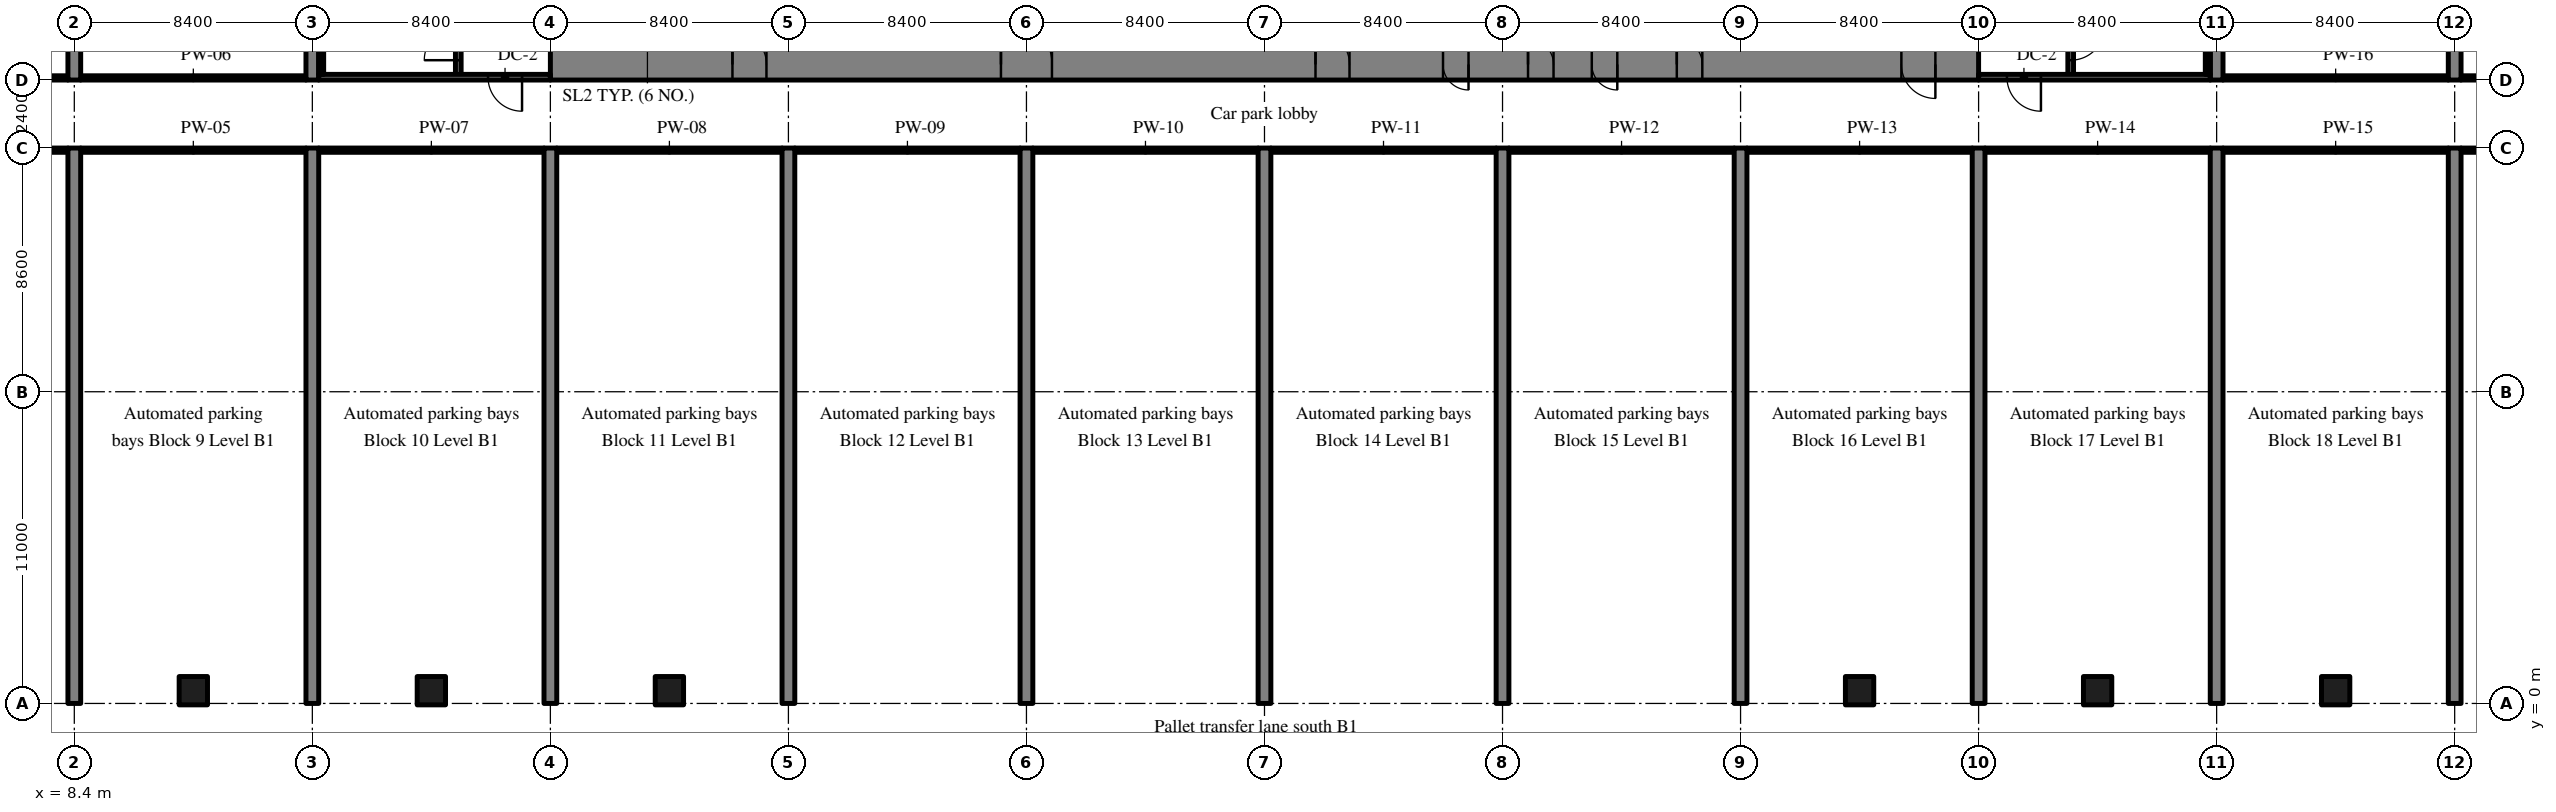
"""IFC4 building model, lengths in metres.
Left out: names, types, materials, properties, quantities, classifications, styles, units other than length and angle.
Written with IfcOpenShell. Run it as: python <this file> out.ifc"""

import sys

from ifc_helpers import new_model, si_unit, direction, frame, frame_2d, origin, origin_2d, place, context, subcontext, project, spatial, rectangle, extrude, source, transform, mapped, element, fill, save


model = new_model("IFC4")
c1 = context("Model", 3, precision=1e-05, world=origin(), true_north=direction((0.0, 1.0)))
c2 = subcontext(c1, "Body", "Model", "MODEL_VIEW")
j1 = project(units=[si_unit("LENGTHUNIT", "METRE"), si_unit("PLANEANGLEUNIT", "RADIAN")], contexts=[c1])
p1 = place(None, origin())
s1 = spatial("IfcSite", under=j1, at=p1, CompositionType="ELEMENT")
p2 = place(p1, origin())
s2 = spatial("IfcBuilding", under=s1, at=p2, CompositionType="ELEMENT")
p3 = place(p2, frame((0.0, 0.0, -4.5)))
s3 = spatial("IfcBuildingStorey", under=s2, at=p3, CompositionType="ELEMENT", Elevation=-4.5)
m1 = source(origin(), c2, "Body", "SweptSolid", [
    extrude(rectangle(XDim=50.4, YDim=1.1, at=frame_2d((25.2, 0.0))), origin(), (0.0, 0.0, 1.0), 4.22),
])
p4 = place(p3, frame((25.2, 22.55, 0.0), z_axis=(0.0, 0.0, 1.0), x_axis=(1.0, 0.0, 0.0)))
e1 = element("IfcWall", 1, at=p4, inside=s3, PredefinedType="SHEAR", context=c2, shape_type="MappedRepresentation", body=[
    mapped(m1, transform((0.0, 0.0, 0.0), scale=1.0)),
])
m2 = source(origin(), c2, "Body", "SweptSolid", [
    extrude(rectangle(XDim=1.8, YDim=2.1, at=frame_2d((0.9, 1.05))), frame((0.0, 0.56, 0.0), z_axis=(0.0, -1.0, 0.0), x_axis=(1.0, 0.0, 0.0)), (0.0, 0.0, 1.0), 1.12),
])
p5 = place(p4, frame((15.9, 0.0, 0.0)))
e2 = element("IfcOpeningElement", 2, at=p5, cuts=e1, PredefinedType="OPENING", context=c2, shape_type="MappedRepresentation", body=[
    mapped(m2, transform((0.0, 0.0, 0.0), scale=1.0)),
])
m3 = source(origin(), c2, "Body", "SweptSolid", [
    extrude(rectangle(XDim=1.2, YDim=2.1, at=frame_2d((0.6, 1.05))), frame((0.0, 0.56, 0.0), z_axis=(0.0, -1.0, 0.0), x_axis=(1.0, 0.0, 0.0)), (0.0, 0.0, 1.0), 1.12),
])
p6 = place(p4, frame((27.0, 0.0, 0.0)))
e3 = element("IfcOpeningElement", 3, at=p6, cuts=e1, PredefinedType="OPENING", context=c2, shape_type="MappedRepresentation", body=[
    mapped(m3, transform((0.0, 0.0, 0.0), scale=1.0)),
])
m4 = source(origin(), c2, "Body", "SweptSolid", [
    extrude(rectangle(XDim=0.9, YDim=2.1, at=frame_2d((0.45, 1.05))), frame((0.0, 0.56, 0.0), z_axis=(0.0, -1.0, 0.0), x_axis=(1.0, 0.0, 0.0)), (0.0, 0.0, 1.0), 1.12),
])
p7 = place(p4, frame((34.5, 0.0, 0.0)))
e4 = element("IfcOpeningElement", 4, at=p7, cuts=e1, PredefinedType="OPENING", context=c2, shape_type="MappedRepresentation", body=[
    mapped(m4, transform((0.0, 0.0, 0.0), scale=1.0)),
])
p8 = place(p4, frame((31.5, 0.0, 0.0)))
e5 = element("IfcOpeningElement", 5, at=p8, cuts=e1, PredefinedType="OPENING", context=c2, shape_type="MappedRepresentation", body=[
    mapped(m4, transform((0.0, 0.0, 0.0), scale=1.0)),
])
p9 = place(p4, frame((39.75, 0.0, 0.0)))
e6 = element("IfcOpeningElement", 6, at=p9, cuts=e1, PredefinedType="OPENING", context=c2, shape_type="MappedRepresentation", body=[
    mapped(m4, transform((0.0, 0.0, 0.0), scale=1.0)),
])
p10 = place(p4, frame((36.75, 0.0, 0.0)))
e7 = element("IfcOpeningElement", 7, at=p10, cuts=e1, PredefinedType="OPENING", context=c2, shape_type="MappedRepresentation", body=[
    mapped(m4, transform((0.0, 0.0, 0.0), scale=1.0)),
])
p11 = place(p4, frame((6.425, 0.0, 0.0)))
e8 = element("IfcOpeningElement", 8, at=p11, cuts=e1, PredefinedType="OPENING", context=c2, shape_type="MappedRepresentation", body=[
    mapped(m3, transform((0.0, 0.0, 0.0), scale=1.0)),
])
p12 = place(p4, frame((47.675, 0.0, 0.0)))
e9 = element("IfcOpeningElement", 9, at=p12, cuts=e1, PredefinedType="OPENING", context=c2, shape_type="MappedRepresentation", body=[
    mapped(m3, transform((0.0, 0.0, 0.0), scale=1.0)),
])
m5 = source(origin(), c2, "Body", "SweptSolid", [
    extrude(rectangle(XDim=19.6, YDim=0.45, at=frame_2d((9.8, 0.0))), origin(), (0.0, 0.0, 1.0), 4.22),
])
p13 = place(p3, frame((8.4, 0.0, 0.0), z_axis=(0.0, 0.0, 1.0), x_axis=(0.0, 1.0, 0.0)))
e10 = element("IfcWall", 10, at=p13, inside=s3, PredefinedType="SHEAR", context=c2, shape_type="MappedRepresentation", body=[
    mapped(m5, transform((0.0, 0.0, 0.0), scale=1.0)),
])
m6 = source(origin(), c2, "Body", "SweptSolid", [
    extrude(rectangle(XDim=20.0, YDim=0.45, at=frame_2d((10.0, 0.0))), origin(), (0.0, 0.0, 1.0), 4.22),
])
p14 = place(p3, frame((8.4, 22.0, 0.0), z_axis=(0.0, 0.0, 1.0), x_axis=(0.0, 1.0, 0.0)))
e11 = element("IfcWall", 11, at=p14, inside=s3, PredefinedType="SHEAR", context=c2, shape_type="MappedRepresentation", body=[
    mapped(m6, transform((0.0, 0.0, 0.0), scale=1.0)),
])
p15 = place(p3, frame((16.8, 0.0, 0.0), z_axis=(0.0, 0.0, 1.0), x_axis=(0.0, 1.0, 0.0)))
e12 = element("IfcWall", 12, at=p15, inside=s3, PredefinedType="SHEAR", context=c2, shape_type="MappedRepresentation", body=[
    mapped(m5, transform((0.0, 0.0, 0.0), scale=1.0)),
])
p16 = place(p3, frame((16.8, 22.0, 0.0), z_axis=(0.0, 0.0, 1.0), x_axis=(0.0, 1.0, 0.0)))
e13 = element("IfcWall", 13, at=p16, inside=s3, PredefinedType="SHEAR", context=c2, shape_type="MappedRepresentation", body=[
    mapped(m6, transform((0.0, 0.0, 0.0), scale=1.0)),
])
for number, where, z_axis, x_axis in (
    (14, (25.2, 0.0, 0.0), (0.0, 0.0, 1.0), (0.0, 1.0, 0.0)),
    (15, (33.6, 0.0, 0.0), (0.0, 0.0, 1.0), (0.0, 1.0, 0.0)),
    (16, (42.0, 0.0, 0.0), (0.0, 0.0, 1.0), (0.0, 1.0, 0.0)),
    (17, (50.4, 0.0, 0.0), (0.0, 0.0, 1.0), (0.0, 1.0, 0.0)),
    (18, (58.8, 0.0, 0.0), (0.0, 0.0, 1.0), (0.0, 1.0, 0.0)),
    (19, (67.2, 0.0, 0.0), (0.0, 0.0, 1.0), (0.0, 1.0, 0.0)),
    (20, (75.6, 0.0, 0.0), (0.0, 0.0, 1.0), (0.0, 1.0, 0.0)),
    (21, (84.0, 0.0, 0.0), (0.0, 0.0, 1.0), (0.0, 1.0, 0.0)),
):
    element("IfcWall", number, at=place(p3, frame(where, z_axis=z_axis, x_axis=x_axis)), inside=s3, PredefinedType="SHEAR", context=c2, shape_type="MappedRepresentation", body=[
        mapped(m5, transform((0.0, 0.0, 0.0), scale=1.0)),
    ])
p17 = place(p3, frame((84.0, 22.0, 0.0), z_axis=(0.0, 0.0, 1.0), x_axis=(0.0, 1.0, 0.0)))
e22 = element("IfcWall", 22, at=p17, inside=s3, PredefinedType="SHEAR", context=c2, shape_type="MappedRepresentation", body=[
    mapped(m6, transform((0.0, 0.0, 0.0), scale=1.0)),
])
p18 = place(p3, frame((92.4, 0.0, 0.0), z_axis=(0.0, 0.0, 1.0), x_axis=(0.0, 1.0, 0.0)))
e23 = element("IfcWall", 23, at=p18, inside=s3, PredefinedType="SHEAR", context=c2, shape_type="MappedRepresentation", body=[
    mapped(m5, transform((0.0, 0.0, 0.0), scale=1.0)),
])
p19 = place(p3, frame((92.4, 22.0, 0.0), z_axis=(0.0, 0.0, 1.0), x_axis=(0.0, 1.0, 0.0)))
e24 = element("IfcWall", 24, at=p19, inside=s3, PredefinedType="SHEAR", context=c2, shape_type="MappedRepresentation", body=[
    mapped(m6, transform((0.0, 0.0, 0.0), scale=1.0)),
])
m7 = source(origin(), c2, "Body", "SweptSolid", [
    extrude(rectangle(XDim=1.0, YDim=1.0, at=origin_2d()), origin(), (0.0, 0.0, 1.0), 4.22),
])
for number, where, z_axis, x_axis in (
    (25, (12.6, 0.45, 0.0), (0.0, 0.0, 1.0), (1.0, 0.0, 0.0)),
    (26, (21.0, 0.45, 0.0), (0.0, 0.0, 1.0), (1.0, 0.0, 0.0)),
    (27, (29.4, 0.45, 0.0), (0.0, 0.0, 1.0), (1.0, 0.0, 0.0)),
    (28, (71.4, 0.45, 0.0), (0.0, 0.0, 1.0), (1.0, 0.0, 0.0)),
    (29, (79.8, 0.45, 0.0), (0.0, 0.0, 1.0), (1.0, 0.0, 0.0)),
    (30, (88.2, 0.45, 0.0), (0.0, 0.0, 1.0), (1.0, 0.0, 0.0)),
):
    element("IfcColumn", number, at=place(p3, frame(where, z_axis=z_axis, x_axis=x_axis)), inside=s3, PredefinedType="COLUMN", context=c2, shape_type="MappedRepresentation", body=[
        mapped(m7, transform((0.0, 0.0, 0.0), scale=1.0)),
    ])
m8 = source(origin(), c2, "Body", "SweptSolid", [
    extrude(rectangle(XDim=8.3, YDim=0.2, at=frame_2d((4.15, 0.0))), origin(), (0.0, 0.0, 1.0), 4.22),
])
p20 = place(p3, frame((21.95, 22.1, 0.0), z_axis=(0.0, 0.0, 1.0), x_axis=(0.0, 1.0, 0.0)))
e31 = element("IfcWall", 31, at=p20, inside=s3, PredefinedType="SOLIDWALL", context=c2, shape_type="MappedRepresentation", body=[
    mapped(m8, transform((0.0, 0.0, 0.0), scale=1.0)),
])
m9 = source(origin(), c2, "Body", "SweptSolid", [
    extrude(rectangle(XDim=1.2, YDim=2.1, at=frame_2d((0.6, 1.05))), frame((0.0, 0.11, 0.0), z_axis=(0.0, -1.0, 0.0), x_axis=(1.0, 0.0, 0.0)), (0.0, 0.0, 1.0), 0.22),
])
p21 = place(p20, frame((0.6, 0.0, 0.0)))
e32 = element("IfcOpeningElement", 32, at=p21, cuts=e31, PredefinedType="OPENING", context=c2, shape_type="MappedRepresentation", body=[
    mapped(m9, transform((0.0, 0.0, 0.0), scale=1.0)),
])
m10 = source(origin(), c2, "Body", "SweptSolid", [
    extrude(rectangle(XDim=8.175, YDim=0.2, at=frame_2d((4.087, 0.0))), origin(), (0.0, 0.0, 1.0), 4.22),
])
p22 = place(p3, frame((17.025, 22.1, 0.0), z_axis=(0.0, 0.0, 1.0), x_axis=(1.0, 0.0, 0.0)))
e33 = element("IfcWall", 33, at=p22, inside=s3, PredefinedType="SOLIDWALL", context=c2, shape_type="MappedRepresentation", body=[
    mapped(m10, transform((0.0, 0.0, 0.0), scale=1.0)),
])
p23 = place(p22, frame((5.975, 0.0, 0.0)))
e34 = element("IfcOpeningElement", 34, at=p23, cuts=e33, PredefinedType="OPENING", context=c2, shape_type="MappedRepresentation", body=[
    mapped(m9, transform((0.0, 0.0, 0.0), scale=1.0)),
])
p24 = place(p3, frame((78.85, 22.1, 0.0), z_axis=(0.0, 0.0, 1.0), x_axis=(0.0, 1.0, 0.0)))
e35 = element("IfcWall", 35, at=p24, inside=s3, PredefinedType="SOLIDWALL", context=c2, shape_type="MappedRepresentation", body=[
    mapped(m8, transform((0.0, 0.0, 0.0), scale=1.0)),
])
p25 = place(p24, frame((0.6, 0.0, 0.0)))
e36 = element("IfcOpeningElement", 36, at=p25, cuts=e35, PredefinedType="OPENING", context=c2, shape_type="MappedRepresentation", body=[
    mapped(m9, transform((0.0, 0.0, 0.0), scale=1.0)),
])
m11 = source(origin(), c2, "Body", "SweptSolid", [
    extrude(rectangle(XDim=8.175, YDim=0.2, at=frame_2d((4.087, 0.0))), origin(), (0.0, 0.0, 1.0), 4.22),
])
p26 = place(p3, frame((83.775, 22.1, 0.0), z_axis=(0.0, 0.0, 1.0), x_axis=(-1.0, 0.0, 0.0)))
e37 = element("IfcWall", 37, at=p26, inside=s3, PredefinedType="SOLIDWALL", context=c2, shape_type="MappedRepresentation", body=[
    mapped(m11, transform((0.0, 0.0, 0.0), scale=1.0)),
])
p27 = place(p26, frame((5.975, 0.0, 0.0)))
e38 = element("IfcOpeningElement", 38, at=p27, cuts=e37, PredefinedType="OPENING", context=c2, shape_type="MappedRepresentation", body=[
    mapped(m9, transform((0.0, 0.0, 0.0), scale=1.0)),
])
m12 = source(origin(), c2, "Body", "SweptSolid", [
    extrude(rectangle(XDim=8.1, YDim=0.175, at=frame_2d((4.05, 0.0))), origin(), (0.0, 0.0, 1.0), 4.22),
])
for number, where, z_axis, x_axis in (
    (39, (17.112, 22.2, 0.0), (0.0, 0.0, 1.0), (0.0, 1.0, 0.0)),
    (40, (83.688, 22.2, 0.0), (0.0, 0.0, 1.0), (0.0, 1.0, 0.0)),
):
    element("IfcWall", number, at=place(p3, frame(where, z_axis=z_axis, x_axis=x_axis)), inside=s3, PredefinedType="SOLIDWALL", context=c2, shape_type="MappedRepresentation", body=[
        mapped(m12, transform((0.0, 0.0, 0.0), scale=1.0)),
    ])
m13 = source(origin(), c2, "Body", "SweptSolid", [
    extrude(rectangle(XDim=7.725, YDim=0.15, at=frame_2d((3.863, 0.0))), origin(), (0.0, 0.0, 1.0), 4.22),
])
for number, where, z_axis, x_axis in (
    (41, (0.45, 19.525, 0.0), (0.0, 0.0, 1.0), (1.0, 0.0, 0.0)),
    (42, (0.45, 22.075, 0.0), (0.0, 0.0, 1.0), (1.0, 0.0, 0.0)),
):
    element("IfcWall", number, at=place(p3, frame(where, z_axis=z_axis, x_axis=x_axis)), inside=s3, PredefinedType="PARTITIONING", context=c2, shape_type="MappedRepresentation", body=[
        mapped(m13, transform((0.0, 0.0, 0.0), scale=1.0)),
    ])
m14 = source(origin(), c2, "Body", "SweptSolid", [
    extrude(rectangle(XDim=7.95, YDim=0.15, at=frame_2d((3.975, 0.0))), origin(), (0.0, 0.0, 1.0), 4.22),
])
for number, where, z_axis, x_axis in (
    (43, (8.625, 19.525, 0.0), (0.0, 0.0, 1.0), (1.0, 0.0, 0.0)),
    (44, (8.625, 22.075, 0.0), (0.0, 0.0, 1.0), (1.0, 0.0, 0.0)),
):
    element("IfcWall", number, at=place(p3, frame(where, z_axis=z_axis, x_axis=x_axis)), inside=s3, PredefinedType="PARTITIONING", context=c2, shape_type="MappedRepresentation", body=[
        mapped(m14, transform((0.0, 0.0, 0.0), scale=1.0)),
    ])
m15 = source(origin(), c2, "Body", "SweptSolid", [
    extrude(rectangle(XDim=7.95, YDim=0.15, at=frame_2d((3.975, 0.0))), origin(), (0.0, 0.0, 1.0), 4.22),
])
p28 = place(p3, frame((17.025, 19.525, 0.0), z_axis=(0.0, 0.0, 1.0), x_axis=(1.0, 0.0, 0.0)))
e45 = element("IfcWall", 45, at=p28, inside=s3, PredefinedType="PARTITIONING", context=c2, shape_type="MappedRepresentation", body=[
    mapped(m15, transform((0.0, 0.0, 0.0), scale=1.0)),
])
for number, where, z_axis, x_axis in (
    (46, (25.425, 19.525, 0.0), (0.0, 0.0, 1.0), (1.0, 0.0, 0.0)),
    (47, (33.825, 19.525, 0.0), (0.0, 0.0, 1.0), (1.0, 0.0, 0.0)),
    (48, (42.225, 19.525, 0.0), (0.0, 0.0, 1.0), (1.0, 0.0, 0.0)),
    (49, (50.625, 19.525, 0.0), (0.0, 0.0, 1.0), (1.0, 0.0, 0.0)),
):
    element("IfcWall", number, at=place(p3, frame(where, z_axis=z_axis, x_axis=x_axis)), inside=s3, PredefinedType="PARTITIONING", context=c2, shape_type="MappedRepresentation", body=[
        mapped(m14, transform((0.0, 0.0, 0.0), scale=1.0)),
    ])
p29 = place(p3, frame((59.025, 19.525, 0.0), z_axis=(0.0, 0.0, 1.0), x_axis=(1.0, 0.0, 0.0)))
e50 = element("IfcWall", 50, at=p29, inside=s3, PredefinedType="PARTITIONING", context=c2, shape_type="MappedRepresentation", body=[
    mapped(m15, transform((0.0, 0.0, 0.0), scale=1.0)),
])
for number, where, z_axis, x_axis in (
    (51, (67.425, 19.525, 0.0), (0.0, 0.0, 1.0), (1.0, 0.0, 0.0)),
    (52, (75.825, 19.525, 0.0), (0.0, 0.0, 1.0), (1.0, 0.0, 0.0)),
    (53, (84.225, 19.525, 0.0), (0.0, 0.0, 1.0), (1.0, 0.0, 0.0)),
    (54, (84.225, 22.075, 0.0), (0.0, 0.0, 1.0), (1.0, 0.0, 0.0)),
):
    element("IfcWall", number, at=place(p3, frame(where, z_axis=z_axis, x_axis=x_axis)), inside=s3, PredefinedType="PARTITIONING", context=c2, shape_type="MappedRepresentation", body=[
        mapped(m14, transform((0.0, 0.0, 0.0), scale=1.0)),
    ])
for number, where, z_axis, x_axis in (
    (55, (92.625, 19.525, 0.0), (0.0, 0.0, 1.0), (1.0, 0.0, 0.0)),
    (56, (92.625, 22.075, 0.0), (0.0, 0.0, 1.0), (1.0, 0.0, 0.0)),
):
    element("IfcWall", number, at=place(p3, frame(where, z_axis=z_axis, x_axis=x_axis)), inside=s3, PredefinedType="PARTITIONING", context=c2, shape_type="MappedRepresentation", body=[
        mapped(m13, transform((0.0, 0.0, 0.0), scale=1.0)),
    ])
m16 = source(origin(), c2, "Body", "SweptSolid", [
    extrude(rectangle(XDim=1.8, YDim=2.1, at=frame_2d((0.9, 1.05))), frame((0.0, 0.325, 0.0), z_axis=(0.0, -1.0, 0.0), x_axis=(1.0, 0.0, 0.0)), (0.0, 0.0, 1.0), 0.05),
])
p30 = place(p5, origin())
e57 = element("IfcDoor", 57, at=p30, inside=s3, OperationType="DOUBLE_DOOR_SINGLE_SWING", PredefinedType="DOOR", context=c2, shape_type="MappedRepresentation", body=[
    mapped(m16, transform((0.0, 0.0, 0.0), scale=1.0)),
])
fill(e2, e57)
m17 = source(origin(), c2, "Body", "SweptSolid", [
    extrude(rectangle(XDim=1.2, YDim=2.1, at=frame_2d((0.6, 1.05))), frame((0.0, 0.325, 0.0), z_axis=(0.0, -1.0, 0.0), x_axis=(1.0, 0.0, 0.0)), (0.0, 0.0, 1.0), 0.05),
])
p31 = place(p6, origin())
e58 = element("IfcDoor", 58, at=p31, inside=s3, OperationType="SINGLE_SWING_LEFT", PredefinedType="DOOR", context=c2, shape_type="MappedRepresentation", body=[
    mapped(m17, transform((0.0, 0.0, 0.0), scale=1.0)),
])
fill(e3, e58)
m18 = source(origin(), c2, "Body", "SweptSolid", [
    extrude(rectangle(XDim=0.9, YDim=2.1, at=frame_2d((0.45, 1.05))), frame((0.0, 0.325, 0.0), z_axis=(0.0, -1.0, 0.0), x_axis=(1.0, 0.0, 0.0)), (0.0, 0.0, 1.0), 0.05),
])
p32 = place(p7, origin())
e59 = element("IfcDoor", 59, at=p32, inside=s3, OperationType="SINGLE_SWING_LEFT", PredefinedType="DOOR", context=c2, shape_type="MappedRepresentation", body=[
    mapped(m18, transform((0.0, 0.0, 0.0), scale=1.0)),
])
fill(e4, e59)
p33 = place(p8, origin())
e60 = element("IfcDoor", 60, at=p33, inside=s3, OperationType="SINGLE_SWING_RIGHT", PredefinedType="DOOR", context=c2, shape_type="MappedRepresentation", body=[
    mapped(m18, transform((0.0, 0.0, 0.0), scale=1.0)),
])
fill(e5, e60)
p34 = place(p9, origin())
e61 = element("IfcDoor", 61, at=p34, inside=s3, OperationType="SINGLE_SWING_LEFT", PredefinedType="DOOR", context=c2, shape_type="MappedRepresentation", body=[
    mapped(m18, transform((0.0, 0.0, 0.0), scale=1.0)),
])
fill(e6, e61)
p35 = place(p10, origin())
e62 = element("IfcDoor", 62, at=p35, inside=s3, OperationType="SINGLE_SWING_RIGHT", PredefinedType="DOOR", context=c2, shape_type="MappedRepresentation", body=[
    mapped(m18, transform((0.0, 0.0, 0.0), scale=1.0)),
])
fill(e7, e62)
p36 = place(p11, origin())
e63 = element("IfcDoor", 63, at=p36, inside=s3, OperationType="SINGLE_SWING_LEFT", PredefinedType="DOOR", context=c2, shape_type="MappedRepresentation", body=[
    mapped(m17, transform((0.0, 0.0, 0.0), scale=1.0)),
])
fill(e8, e63)
p37 = place(p12, origin())
e64 = element("IfcDoor", 64, at=p37, inside=s3, OperationType="SINGLE_SWING_RIGHT", PredefinedType="DOOR", context=c2, shape_type="MappedRepresentation", body=[
    mapped(m17, transform((0.0, 0.0, 0.0), scale=1.0)),
])
fill(e9, e64)
m19 = source(origin(), c2, "Body", "SweptSolid", [
    extrude(rectangle(XDim=1.2, YDim=2.1, at=frame_2d((0.6, 1.05))), frame((0.0, 0.025, 0.0), z_axis=(0.0, -1.0, 0.0), x_axis=(1.0, 0.0, 0.0)), (0.0, 0.0, 1.0), 0.05),
])
p38 = place(p21, origin())
e65 = element("IfcDoor", 65, at=p38, inside=s3, OperationType="SINGLE_SWING_LEFT", PredefinedType="DOOR", context=c2, shape_type="MappedRepresentation", body=[
    mapped(m19, transform((0.0, 0.0, 0.0), scale=1.0)),
])
fill(e32, e65)
p39 = place(p23, origin())
e66 = element("IfcDoor", 66, at=p39, inside=s3, OperationType="SINGLE_SWING_RIGHT", PredefinedType="DOOR", context=c2, shape_type="MappedRepresentation", body=[
    mapped(m19, transform((0.0, 0.0, 0.0), scale=1.0)),
])
fill(e34, e66)
p40 = place(p25, origin())
e67 = element("IfcDoor", 67, at=p40, inside=s3, OperationType="SINGLE_SWING_RIGHT", PredefinedType="DOOR", context=c2, shape_type="MappedRepresentation", body=[
    mapped(m19, transform((0.0, 0.0, 0.0), scale=1.0)),
])
fill(e36, e67)
p41 = place(p27, origin())
e68 = element("IfcDoor", 68, at=p41, inside=s3, OperationType="SINGLE_SWING_LEFT", PredefinedType="DOOR", context=c2, shape_type="MappedRepresentation", body=[
    mapped(m19, transform((0.0, 0.0, 0.0), scale=1.0)),
])
fill(e38, e68)
save(model, sys.argv[1])
